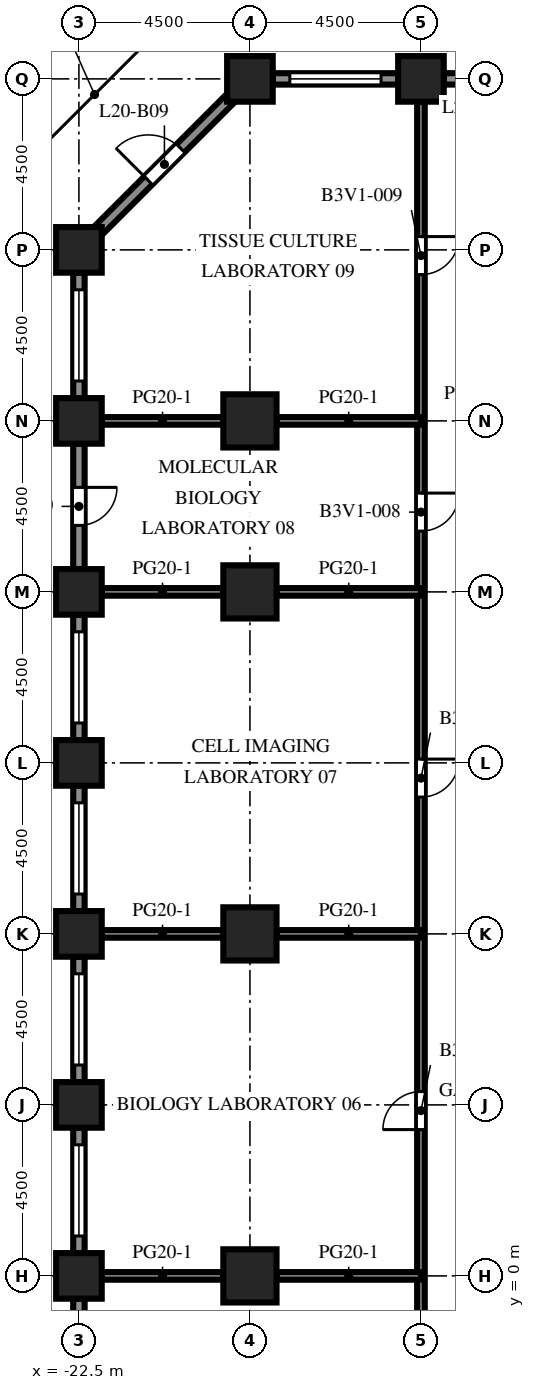
"""IFC4 building model, lengths in metres.
Left out: names, types, materials, properties, quantities, classifications, styles, units other than length and angle.
Written with IfcOpenShell. Run it as: python <this file> out.ifc"""

import sys

from ifc_helpers import new_model, si_unit, direction, frame, frame_2d, origin, origin_2d, place, context, subcontext, project, spatial, rectangle, extrude, element, fill, save


model = new_model("IFC4")
c1 = context("Model", 3, precision=1e-05, world=origin(), true_north=direction((0.0, 1.0)))
c2 = subcontext(c1, "Body", "Model", "MODEL_VIEW")
j1 = project(units=[si_unit("LENGTHUNIT", "METRE"), si_unit("PLANEANGLEUNIT", "RADIAN")], contexts=[c1])
p1 = place(None, origin())
s1 = spatial("IfcSite", under=j1, at=p1, CompositionType="ELEMENT")
p2 = place(p1, origin())
s2 = spatial("IfcBuilding", under=s1, at=p2, CompositionType="ELEMENT")
p3 = place(p2, frame((0.0, 0.0, 90.2)))
s3 = spatial("IfcBuildingStorey", under=s2, at=p3, CompositionType="ELEMENT", Elevation=90.2)
for number, where, z_axis, x_axis in (
    (1, (-22.5, 0.0, 0.0), (0.0, 0.0, 1.0), (1.0, 0.0, 0.0)),
    (2, (-22.5, 4.5, 0.0), (0.0, 0.0, 1.0), (1.0, 0.0, 0.0)),
    (3, (-22.5, 9.0, 0.0), (0.0, 0.0, 1.0), (1.0, 0.0, 0.0)),
    (4, (-22.5, 13.5, 0.0), (0.0, 0.0, 1.0), (1.0, 0.0, 0.0)),
    (5, (-22.5, 18.0, 0.0), (0.0, 0.0, 1.0), (1.0, 0.0, 0.0)),
    (6, (-22.5, 22.5, 0.0), (0.0, 0.0, 1.0), (1.0, 0.0, 0.0)),
    (7, (-22.5, 27.0, 0.0), (0.0, 0.0, 1.0), (1.0, 0.0, 0.0)),
    (8, (-18.0, 31.5, 0.0), (0.0, 0.0, 1.0), (1.0, 0.0, 0.0)),
    (9, (-13.5, 31.5, 0.0), (0.0, 0.0, 1.0), (1.0, 0.0, 0.0)),
):
    element("IfcColumn", number, at=place(p3, frame(where, z_axis=z_axis, x_axis=x_axis)), inside=s3, PredefinedType="COLUMN", context=c2, shape_type="SweptSolid", body=[
        extrude(rectangle(XDim=1.2, YDim=1.2, at=origin_2d()), origin(), (0.0, 0.0, 1.0), 4.1),
    ])
for number, where, z_axis, x_axis in (
    (10, (-18.0, 0.0, 0.0), (0.0, 0.0, 1.0), (1.0, 0.0, 0.0)),
    (11, (-18.0, 9.0, 0.0), (0.0, 0.0, 1.0), (1.0, 0.0, 0.0)),
    (12, (-18.0, 18.0, 0.0), (0.0, 0.0, 1.0), (1.0, 0.0, 0.0)),
    (13, (-18.0, 22.5, 0.0), (0.0, 0.0, 1.0), (1.0, 0.0, 0.0)),
):
    element("IfcColumn", number, at=place(p3, frame(where, z_axis=z_axis, x_axis=x_axis)), inside=s3, PredefinedType="COLUMN", context=c2, shape_type="SweptSolid", body=[
        extrude(rectangle(XDim=1.4, YDim=1.4, at=origin_2d()), origin(), (0.0, 0.0, 1.0), 4.1),
    ])
p4 = place(p3, frame((-12.9, 31.5, 0.0), z_axis=(0.0, 0.0, 1.0), x_axis=(1.0, 0.0, 0.0)))
e14 = element("IfcWall", 14, at=p4, inside=s3, PredefinedType="SOLIDWALL", context=c2, shape_type="SweptSolid", body=[
    extrude(rectangle(XDim=3.3, YDim=0.3, at=frame_2d((1.65, 0.0))), origin(), (0.0, 0.0, 1.0), 2.75),
])
p5 = place(p4, frame((1.15, 0.0, 0.0)))
e15 = element("IfcOpeningElement", 15, at=p5, cuts=e14, PredefinedType="OPENING", context=c2, shape_type="SweptSolid", body=[
    extrude(rectangle(XDim=1.0, YDim=2.2, at=frame_2d((0.5, 1.1))), frame((0.0, 0.16, 0.0), z_axis=(0.0, -1.0, 0.0), x_axis=(1.0, 0.0, 0.0)), (0.0, 0.0, 1.0), 0.32),
])
p6 = place(p3, frame((-17.4, 31.5, 0.0), z_axis=(0.0, 0.0, 1.0), x_axis=(1.0, 0.0, 0.0)))
e16 = element("IfcWall", 16, at=p6, inside=s3, PredefinedType="SOLIDWALL", context=c2, shape_type="SweptSolid", body=[
    extrude(rectangle(XDim=3.3, YDim=0.3, at=frame_2d((1.65, 0.0))), origin(), (0.0, 0.0, 1.0), 2.75),
])
p7 = place(p6, frame((0.45, 0.0, 0.8)))
e17 = element("IfcOpeningElement", 17, at=p7, cuts=e16, PredefinedType="OPENING", context=c2, shape_type="SweptSolid", body=[
    extrude(rectangle(XDim=2.4, YDim=1.7, at=frame_2d((1.2, 0.85))), frame((0.0, 0.16, 0.0), z_axis=(0.0, -1.0, 0.0), x_axis=(1.0, 0.0, 0.0)), (0.0, 0.0, 1.0), 0.32),
])
p8 = place(p3, frame((-22.006, 27.494, 0.0), z_axis=(0.0, 0.0, 1.0), x_axis=(0.707106781187, 0.707106781187, 0.0)))
e18 = element("IfcWall", 18, at=p8, inside=s3, PredefinedType="SOLIDWALL", context=c2, shape_type="SweptSolid", body=[
    extrude(rectangle(XDim=4.967, YDim=0.3, at=frame_2d((2.483, 0.0))), origin(), (0.0, 0.0, 1.0), 2.75),
])
p9 = place(p8, frame((1.884, 0.0, 0.0)))
e19 = element("IfcOpeningElement", 19, at=p9, cuts=e18, PredefinedType="OPENING", context=c2, shape_type="SweptSolid", body=[
    extrude(rectangle(XDim=1.2, YDim=2.2, at=frame_2d((0.6, 1.1))), frame((0.0, 0.16, 0.0), z_axis=(0.0, -1.0, 0.0), x_axis=(1.0, 0.0, 0.0)), (0.0, 0.0, 1.0), 0.32),
])
p10 = place(p3, frame((-22.5, 23.1, 0.0), z_axis=(0.0, 0.0, 1.0), x_axis=(0.0, 1.0, 0.0)))
e20 = element("IfcWall", 20, at=p10, inside=s3, PredefinedType="SOLIDWALL", context=c2, shape_type="SweptSolid", body=[
    extrude(rectangle(XDim=3.3, YDim=0.3, at=frame_2d((1.65, 0.0))), origin(), (0.0, 0.0, 1.0), 2.75),
])
p11 = place(p10, frame((0.45, 0.0, 0.8)))
e21 = element("IfcOpeningElement", 21, at=p11, cuts=e20, PredefinedType="OPENING", context=c2, shape_type="SweptSolid", body=[
    extrude(rectangle(XDim=2.4, YDim=1.7, at=frame_2d((1.2, 0.85))), frame((0.0, 0.16, 0.0), z_axis=(0.0, -1.0, 0.0), x_axis=(1.0, 0.0, 0.0)), (0.0, 0.0, 1.0), 0.32),
])
p12 = place(p3, frame((-22.5, 18.6, 0.0), z_axis=(0.0, 0.0, 1.0), x_axis=(0.0, 1.0, 0.0)))
e22 = element("IfcWall", 22, at=p12, inside=s3, PredefinedType="SOLIDWALL", context=c2, shape_type="SweptSolid", body=[
    extrude(rectangle(XDim=3.3, YDim=0.3, at=frame_2d((1.65, 0.0))), origin(), (0.0, 0.0, 1.0), 2.75),
])
p13 = place(p12, frame((1.15, 0.0, 0.0)))
e23 = element("IfcOpeningElement", 23, at=p13, cuts=e22, PredefinedType="OPENING", context=c2, shape_type="SweptSolid", body=[
    extrude(rectangle(XDim=1.0, YDim=2.2, at=frame_2d((0.5, 1.1))), frame((0.0, 0.16, 0.0), z_axis=(0.0, -1.0, 0.0), x_axis=(1.0, 0.0, 0.0)), (0.0, 0.0, 1.0), 0.32),
])
p14 = place(p3, frame((-22.5, 14.1, 0.0), z_axis=(0.0, 0.0, 1.0), x_axis=(0.0, 1.0, 0.0)))
e24 = element("IfcWall", 24, at=p14, inside=s3, PredefinedType="SOLIDWALL", context=c2, shape_type="SweptSolid", body=[
    extrude(rectangle(XDim=3.3, YDim=0.3, at=frame_2d((1.65, 0.0))), origin(), (0.0, 0.0, 1.0), 2.75),
])
p15 = place(p14, frame((0.45, 0.0, 0.8)))
e25 = element("IfcOpeningElement", 25, at=p15, cuts=e24, PredefinedType="OPENING", context=c2, shape_type="SweptSolid", body=[
    extrude(rectangle(XDim=2.4, YDim=1.7, at=frame_2d((1.2, 0.85))), frame((0.0, 0.16, 0.0), z_axis=(0.0, -1.0, 0.0), x_axis=(1.0, 0.0, 0.0)), (0.0, 0.0, 1.0), 0.32),
])
p16 = place(p3, frame((-22.5, 9.6, 0.0), z_axis=(0.0, 0.0, 1.0), x_axis=(0.0, 1.0, 0.0)))
e26 = element("IfcWall", 26, at=p16, inside=s3, PredefinedType="SOLIDWALL", context=c2, shape_type="SweptSolid", body=[
    extrude(rectangle(XDim=3.3, YDim=0.3, at=frame_2d((1.65, 0.0))), origin(), (0.0, 0.0, 1.0), 2.75),
])
p17 = place(p16, frame((0.45, 0.0, 0.8)))
e27 = element("IfcOpeningElement", 27, at=p17, cuts=e26, PredefinedType="OPENING", context=c2, shape_type="SweptSolid", body=[
    extrude(rectangle(XDim=2.4, YDim=1.7, at=frame_2d((1.2, 0.85))), frame((0.0, 0.16, 0.0), z_axis=(0.0, -1.0, 0.0), x_axis=(1.0, 0.0, 0.0)), (0.0, 0.0, 1.0), 0.32),
])
p18 = place(p3, frame((-22.5, 5.1, 0.0), z_axis=(0.0, 0.0, 1.0), x_axis=(0.0, 1.0, 0.0)))
e28 = element("IfcWall", 28, at=p18, inside=s3, PredefinedType="SOLIDWALL", context=c2, shape_type="SweptSolid", body=[
    extrude(rectangle(XDim=3.3, YDim=0.3, at=frame_2d((1.65, 0.0))), origin(), (0.0, 0.0, 1.0), 2.75),
])
p19 = place(p18, frame((0.45, 0.0, 0.8)))
e29 = element("IfcOpeningElement", 29, at=p19, cuts=e28, PredefinedType="OPENING", context=c2, shape_type="SweptSolid", body=[
    extrude(rectangle(XDim=2.4, YDim=1.7, at=frame_2d((1.2, 0.85))), frame((0.0, 0.16, 0.0), z_axis=(0.0, -1.0, 0.0), x_axis=(1.0, 0.0, 0.0)), (0.0, 0.0, 1.0), 0.32),
])
p20 = place(p3, frame((-22.5, 0.6, 0.0), z_axis=(0.0, 0.0, 1.0), x_axis=(0.0, 1.0, 0.0)))
e30 = element("IfcWall", 30, at=p20, inside=s3, PredefinedType="SOLIDWALL", context=c2, shape_type="SweptSolid", body=[
    extrude(rectangle(XDim=3.3, YDim=0.3, at=frame_2d((1.65, 0.0))), origin(), (0.0, 0.0, 1.0), 2.75),
])
p21 = place(p20, frame((0.45, 0.0, 0.8)))
e31 = element("IfcOpeningElement", 31, at=p21, cuts=e30, PredefinedType="OPENING", context=c2, shape_type="SweptSolid", body=[
    extrude(rectangle(XDim=2.4, YDim=1.7, at=frame_2d((1.2, 0.85))), frame((0.0, 0.16, 0.0), z_axis=(0.0, -1.0, 0.0), x_axis=(1.0, 0.0, 0.0)), (0.0, 0.0, 1.0), 0.32),
])
p22 = place(p3, frame((-22.5, -3.9, 0.0), z_axis=(0.0, 0.0, 1.0), x_axis=(0.0, 1.0, 0.0)))
e32 = element("IfcWall", 32, at=p22, inside=s3, PredefinedType="SOLIDWALL", context=c2, shape_type="SweptSolid", body=[
    extrude(rectangle(XDim=3.3, YDim=0.3, at=frame_2d((1.65, 0.0))), origin(), (0.0, 0.0, 1.0), 2.75),
])
p23 = place(p22, frame((0.45, 0.0, 0.8)))
e33 = element("IfcOpeningElement", 33, at=p23, cuts=e32, PredefinedType="OPENING", context=c2, shape_type="SweptSolid", body=[
    extrude(rectangle(XDim=2.4, YDim=1.7, at=frame_2d((1.2, 0.85))), frame((0.0, 0.16, 0.0), z_axis=(0.0, -1.0, 0.0), x_axis=(1.0, 0.0, 0.0)), (0.0, 0.0, 1.0), 0.32),
])
p24 = place(p3, frame((-13.5, -21.9, 0.0), z_axis=(0.0, 0.0, 1.0), x_axis=(0.0, 1.0, 0.0)))
e34 = element("IfcWall", 34, at=p24, inside=s3, PredefinedType="PARTITIONING", context=c2, shape_type="SweptSolid", body=[
    extrude(rectangle(XDim=52.8, YDim=0.2, at=frame_2d((26.4, 0.0))), origin(), (0.0, 0.0, 1.0), 3.65),
])
p25 = place(p24, frame((3.0, 0.0, 0.0)))
e35 = element("IfcOpeningElement", 35, at=p25, cuts=e34, PredefinedType="OPENING", context=c2, shape_type="SweptSolid", body=[
    extrude(rectangle(XDim=1.0, YDim=2.1, at=frame_2d((0.5, 1.05))), frame((0.0, 0.11, 0.0), z_axis=(0.0, -1.0, 0.0), x_axis=(1.0, 0.0, 0.0)), (0.0, 0.0, 1.0), 0.22),
])
p26 = place(p24, frame((15.0, 0.0, 0.0)))
e36 = element("IfcOpeningElement", 36, at=p26, cuts=e34, PredefinedType="OPENING", context=c2, shape_type="SweptSolid", body=[
    extrude(rectangle(XDim=1.0, YDim=2.1, at=frame_2d((0.5, 1.05))), frame((0.0, 0.11, 0.0), z_axis=(0.0, -1.0, 0.0), x_axis=(1.0, 0.0, 0.0)), (0.0, 0.0, 1.0), 0.22),
])
p27 = place(p24, frame((25.75, 0.0, 0.0)))
e37 = element("IfcOpeningElement", 37, at=p27, cuts=e34, PredefinedType="OPENING", context=c2, shape_type="SweptSolid", body=[
    extrude(rectangle(XDim=1.0, YDim=2.1, at=frame_2d((0.5, 1.05))), frame((0.0, 0.11, 0.0), z_axis=(0.0, -1.0, 0.0), x_axis=(1.0, 0.0, 0.0)), (0.0, 0.0, 1.0), 0.22),
])
p28 = place(p24, frame((34.5, 0.0, 0.0)))
e38 = element("IfcOpeningElement", 38, at=p28, cuts=e34, PredefinedType="OPENING", context=c2, shape_type="SweptSolid", body=[
    extrude(rectangle(XDim=1.0, YDim=2.1, at=frame_2d((0.5, 1.05))), frame((0.0, 0.11, 0.0), z_axis=(0.0, -1.0, 0.0), x_axis=(1.0, 0.0, 0.0)), (0.0, 0.0, 1.0), 0.22),
])
p29 = place(p24, frame((41.5, 0.0, 0.0)))
e39 = element("IfcOpeningElement", 39, at=p29, cuts=e34, PredefinedType="OPENING", context=c2, shape_type="SweptSolid", body=[
    extrude(rectangle(XDim=1.0, YDim=2.1, at=frame_2d((0.5, 1.05))), frame((0.0, 0.11, 0.0), z_axis=(0.0, -1.0, 0.0), x_axis=(1.0, 0.0, 0.0)), (0.0, 0.0, 1.0), 0.22),
])
p30 = place(p24, frame((48.25, 0.0, 0.0)))
e40 = element("IfcOpeningElement", 40, at=p30, cuts=e34, PredefinedType="OPENING", context=c2, shape_type="SweptSolid", body=[
    extrude(rectangle(XDim=1.0, YDim=2.1, at=frame_2d((0.5, 1.05))), frame((0.0, 0.11, 0.0), z_axis=(0.0, -1.0, 0.0), x_axis=(1.0, 0.0, 0.0)), (0.0, 0.0, 1.0), 0.22),
])
p31 = place(p3, frame((-21.9, 0.0, 0.0), z_axis=(0.0, 0.0, 1.0), x_axis=(1.0, 0.0, 0.0)))
e41 = element("IfcWall", 41, at=p31, inside=s3, PredefinedType="PARTITIONING", context=c2, shape_type="SweptSolid", body=[
    extrude(rectangle(XDim=3.2, YDim=0.2, at=frame_2d((1.6, 0.0))), origin(), (0.0, 0.0, 1.0), 3.65),
])
p32 = place(p3, frame((-17.3, 0.0, 0.0), z_axis=(0.0, 0.0, 1.0), x_axis=(1.0, 0.0, 0.0)))
e42 = element("IfcWall", 42, at=p32, inside=s3, PredefinedType="PARTITIONING", context=c2, shape_type="SweptSolid", body=[
    extrude(rectangle(XDim=3.8, YDim=0.2, at=frame_2d((1.9, 0.0))), origin(), (0.0, 0.0, 1.0), 3.65),
])
p33 = place(p3, frame((-21.9, 9.0, 0.0), z_axis=(0.0, 0.0, 1.0), x_axis=(1.0, 0.0, 0.0)))
e43 = element("IfcWall", 43, at=p33, inside=s3, PredefinedType="PARTITIONING", context=c2, shape_type="SweptSolid", body=[
    extrude(rectangle(XDim=3.2, YDim=0.2, at=frame_2d((1.6, 0.0))), origin(), (0.0, 0.0, 1.0), 3.65),
])
p34 = place(p3, frame((-17.3, 9.0, 0.0), z_axis=(0.0, 0.0, 1.0), x_axis=(1.0, 0.0, 0.0)))
e44 = element("IfcWall", 44, at=p34, inside=s3, PredefinedType="PARTITIONING", context=c2, shape_type="SweptSolid", body=[
    extrude(rectangle(XDim=3.8, YDim=0.2, at=frame_2d((1.9, 0.0))), origin(), (0.0, 0.0, 1.0), 3.65),
])
p35 = place(p3, frame((-21.9, 18.0, 0.0), z_axis=(0.0, 0.0, 1.0), x_axis=(1.0, 0.0, 0.0)))
e45 = element("IfcWall", 45, at=p35, inside=s3, PredefinedType="PARTITIONING", context=c2, shape_type="SweptSolid", body=[
    extrude(rectangle(XDim=3.2, YDim=0.2, at=frame_2d((1.6, 0.0))), origin(), (0.0, 0.0, 1.0), 3.65),
])
p36 = place(p3, frame((-17.3, 18.0, 0.0), z_axis=(0.0, 0.0, 1.0), x_axis=(1.0, 0.0, 0.0)))
e46 = element("IfcWall", 46, at=p36, inside=s3, PredefinedType="PARTITIONING", context=c2, shape_type="SweptSolid", body=[
    extrude(rectangle(XDim=3.8, YDim=0.2, at=frame_2d((1.9, 0.0))), origin(), (0.0, 0.0, 1.0), 3.65),
])
p37 = place(p3, frame((-21.9, 22.5, 0.0), z_axis=(0.0, 0.0, 1.0), x_axis=(1.0, 0.0, 0.0)))
e47 = element("IfcWall", 47, at=p37, inside=s3, PredefinedType="PARTITIONING", context=c2, shape_type="SweptSolid", body=[
    extrude(rectangle(XDim=3.2, YDim=0.2, at=frame_2d((1.6, 0.0))), origin(), (0.0, 0.0, 1.0), 3.65),
])
p38 = place(p3, frame((-17.3, 22.5, 0.0), z_axis=(0.0, 0.0, 1.0), x_axis=(1.0, 0.0, 0.0)))
e48 = element("IfcWall", 48, at=p38, inside=s3, PredefinedType="PARTITIONING", context=c2, shape_type="SweptSolid", body=[
    extrude(rectangle(XDim=3.8, YDim=0.2, at=frame_2d((1.9, 0.0))), origin(), (0.0, 0.0, 1.0), 3.65),
])
p39 = place(p7, origin())
e49 = element("IfcWindow", 49, at=p39, inside=s3, PartitioningType="SINGLE_PANEL", PredefinedType="WINDOW", context=c2, shape_type="SweptSolid", body=[
    extrude(rectangle(XDim=2.4, YDim=1.7, at=frame_2d((1.2, 0.85))), frame((0.0, 0.03, 0.0), z_axis=(0.0, -1.0, 0.0), x_axis=(1.0, 0.0, 0.0)), (0.0, 0.0, 1.0), 0.06),
])
fill(e17, e49)
p40 = place(p9, origin())
e50 = element("IfcDoor", 50, at=p40, inside=s3, OperationType="SINGLE_SWING_LEFT", PredefinedType="DOOR", context=c2, shape_type="SweptSolid", body=[
    extrude(rectangle(XDim=1.2, YDim=2.2, at=frame_2d((0.6, 1.1))), frame((0.0, 0.025, 0.0), z_axis=(0.0, -1.0, 0.0), x_axis=(1.0, 0.0, 0.0)), (0.0, 0.0, 1.0), 0.05),
])
fill(e19, e50)
p41 = place(p11, origin())
e51 = element("IfcWindow", 51, at=p41, inside=s3, PartitioningType="SINGLE_PANEL", PredefinedType="WINDOW", context=c2, shape_type="SweptSolid", body=[
    extrude(rectangle(XDim=2.4, YDim=1.7, at=frame_2d((1.2, 0.85))), frame((0.0, 0.03, 0.0), z_axis=(0.0, -1.0, 0.0), x_axis=(1.0, 0.0, 0.0)), (0.0, 0.0, 1.0), 0.06),
])
fill(e21, e51)
p42 = place(p13, origin())
e52 = element("IfcDoor", 52, at=p42, inside=s3, OperationType="SINGLE_SWING_RIGHT", PredefinedType="DOOR", context=c2, shape_type="SweptSolid", body=[
    extrude(rectangle(XDim=1.0, YDim=2.2, at=frame_2d((0.5, 1.1))), frame((0.0, 0.025, 0.0), z_axis=(0.0, -1.0, 0.0), x_axis=(1.0, 0.0, 0.0)), (0.0, 0.0, 1.0), 0.05),
])
fill(e23, e52)
p43 = place(p15, origin())
e53 = element("IfcWindow", 53, at=p43, inside=s3, PartitioningType="SINGLE_PANEL", PredefinedType="WINDOW", context=c2, shape_type="SweptSolid", body=[
    extrude(rectangle(XDim=2.4, YDim=1.7, at=frame_2d((1.2, 0.85))), frame((0.0, 0.03, 0.0), z_axis=(0.0, -1.0, 0.0), x_axis=(1.0, 0.0, 0.0)), (0.0, 0.0, 1.0), 0.06),
])
fill(e25, e53)
p44 = place(p17, origin())
e54 = element("IfcWindow", 54, at=p44, inside=s3, PartitioningType="SINGLE_PANEL", PredefinedType="WINDOW", context=c2, shape_type="SweptSolid", body=[
    extrude(rectangle(XDim=2.4, YDim=1.7, at=frame_2d((1.2, 0.85))), frame((0.0, 0.03, 0.0), z_axis=(0.0, -1.0, 0.0), x_axis=(1.0, 0.0, 0.0)), (0.0, 0.0, 1.0), 0.06),
])
fill(e27, e54)
p45 = place(p19, origin())
e55 = element("IfcWindow", 55, at=p45, inside=s3, PartitioningType="SINGLE_PANEL", PredefinedType="WINDOW", context=c2, shape_type="SweptSolid", body=[
    extrude(rectangle(XDim=2.4, YDim=1.7, at=frame_2d((1.2, 0.85))), frame((0.0, 0.03, 0.0), z_axis=(0.0, -1.0, 0.0), x_axis=(1.0, 0.0, 0.0)), (0.0, 0.0, 1.0), 0.06),
])
fill(e29, e55)
p46 = place(p21, origin())
e56 = element("IfcWindow", 56, at=p46, inside=s3, PartitioningType="SINGLE_PANEL", PredefinedType="WINDOW", context=c2, shape_type="SweptSolid", body=[
    extrude(rectangle(XDim=2.4, YDim=1.7, at=frame_2d((1.2, 0.85))), frame((0.0, 0.03, 0.0), z_axis=(0.0, -1.0, 0.0), x_axis=(1.0, 0.0, 0.0)), (0.0, 0.0, 1.0), 0.06),
])
fill(e31, e56)
p47 = place(p27, origin())
e57 = element("IfcDoor", 57, at=p47, inside=s3, OperationType="SINGLE_SWING_LEFT", PredefinedType="DOOR", context=c2, shape_type="SweptSolid", body=[
    extrude(rectangle(XDim=1.0, YDim=2.1, at=frame_2d((0.5, 1.05))), frame((0.0, 0.025, 0.0), z_axis=(0.0, -1.0, 0.0), x_axis=(1.0, 0.0, 0.0)), (0.0, 0.0, 1.0), 0.05),
])
fill(e37, e57)
p48 = place(p28, origin())
e58 = element("IfcDoor", 58, at=p48, inside=s3, OperationType="SINGLE_SWING_RIGHT", PredefinedType="DOOR", context=c2, shape_type="SweptSolid", body=[
    extrude(rectangle(XDim=1.0, YDim=2.1, at=frame_2d((0.5, 1.05))), frame((0.0, 0.025, 0.0), z_axis=(0.0, -1.0, 0.0), x_axis=(1.0, 0.0, 0.0)), (0.0, 0.0, 1.0), 0.05),
])
fill(e38, e58)
p49 = place(p29, origin())
e59 = element("IfcDoor", 59, at=p49, inside=s3, OperationType="SINGLE_SWING_RIGHT", PredefinedType="DOOR", context=c2, shape_type="SweptSolid", body=[
    extrude(rectangle(XDim=1.0, YDim=2.1, at=frame_2d((0.5, 1.05))), frame((0.0, 0.025, 0.0), z_axis=(0.0, -1.0, 0.0), x_axis=(1.0, 0.0, 0.0)), (0.0, 0.0, 1.0), 0.05),
])
fill(e39, e59)
p50 = place(p30, origin())
e60 = element("IfcDoor", 60, at=p50, inside=s3, OperationType="SINGLE_SWING_RIGHT", PredefinedType="DOOR", context=c2, shape_type="SweptSolid", body=[
    extrude(rectangle(XDim=1.0, YDim=2.1, at=frame_2d((0.5, 1.05))), frame((0.0, 0.025, 0.0), z_axis=(0.0, -1.0, 0.0), x_axis=(1.0, 0.0, 0.0)), (0.0, 0.0, 1.0), 0.05),
])
fill(e40, e60)
save(model, sys.argv[1])
